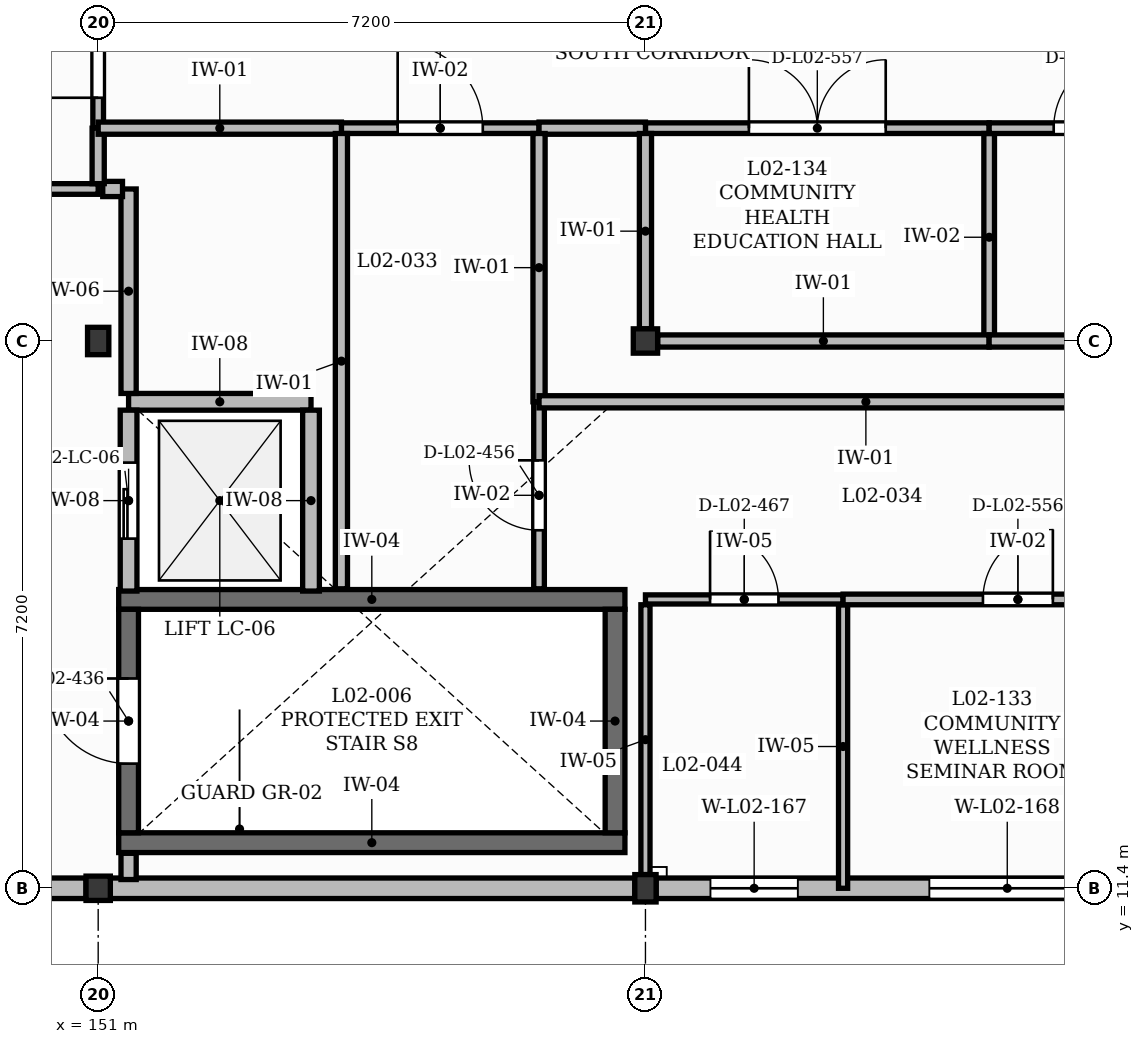
"""IFC4 building model, lengths in metres.
Left out: names, types, materials, properties, quantities, classifications, styles, units other than length and angle.
Written with IfcOpenShell. Run it as: python <this file> out.ifc"""

import sys

from ifc_helpers import new_model, si_unit, direction, frame, frame_2d, origin, origin_2d, place, context, subcontext, project, spatial, rectangle, extrude, element, fill, save


model = new_model("IFC4")
c1 = context("Model", 3, precision=1e-05, world=origin(), true_north=direction((0.0, 1.0)))
c2 = subcontext(c1, "Body", "Model", "MODEL_VIEW")
j1 = project(units=[si_unit("LENGTHUNIT", "METRE"), si_unit("PLANEANGLEUNIT", "RADIAN")], contexts=[c1])
p1 = place(None, origin())
s1 = spatial("IfcSite", under=j1, at=p1, CompositionType="ELEMENT")
p2 = place(p1, origin())
s2 = spatial("IfcBuilding", under=s1, at=p2, CompositionType="ELEMENT")
p3 = place(p2, frame((0.0, 0.0, 9.0)))
s3 = spatial("IfcBuildingStorey", under=s2, at=p3, CompositionType="ELEMENT", Elevation=9.0)
p4 = place(p3, frame((151.0, 11.4, 0.0), z_axis=(0.0, 0.0, 1.0), x_axis=(1.0, 0.0, 0.0)))
e1 = element("IfcColumn", 1, at=p4, inside=s3, PredefinedType="COLUMN", context=c2, shape_type="SweptSolid", body=[
    extrude(rectangle(XDim=0.32, YDim=0.32, at=origin_2d()), origin(), (0.0, 0.0, 1.0), 5.775),
])
p5 = place(p3, frame((151.0, 18.6, 0.0), z_axis=(0.0, 0.0, 1.0), x_axis=(1.0, 0.0, 0.0)))
e2 = element("IfcColumn", 2, at=p5, inside=s3, PredefinedType="COLUMN", context=c2, shape_type="SweptSolid", body=[
    extrude(rectangle(XDim=0.28, YDim=0.36, at=origin_2d()), origin(), (0.0, 0.0, 1.0), 5.775),
])
p6 = place(p3, frame((158.2, 11.4, 0.0), z_axis=(0.0, 0.0, 1.0), x_axis=(1.0, 0.0, 0.0)))
e3 = element("IfcColumn", 3, at=p6, inside=s3, PredefinedType="COLUMN", context=c2, shape_type="SweptSolid", body=[
    extrude(rectangle(XDim=0.28, YDim=0.36, at=origin_2d()), origin(), (0.0, 0.0, 1.0), 7.57),
])
p7 = place(p3, frame((158.2, 18.6, 0.0), z_axis=(0.0, 0.0, 1.0), x_axis=(1.0, 0.0, 0.0)))
e4 = element("IfcColumn", 4, at=p7, inside=s3, PredefinedType="COLUMN", context=c2, shape_type="SweptSolid", body=[
    extrude(rectangle(XDim=0.32, YDim=0.32, at=origin_2d()), origin(), (0.0, 0.0, 1.0), 7.57),
])
p8 = place(p3, frame((143.94, 11.4, 0.0), z_axis=(0.0, 0.0, 1.0), x_axis=(1.0, 0.0, 0.0)))
e5 = element("IfcWall", 5, at=p8, inside=s3, PredefinedType="SOLIDWALL", context=c2, shape_type="SweptSolid", body=[
    extrude(rectangle(XDim=6.9, YDim=0.27, at=frame_2d((3.45, 0.0))), origin(), (0.0, 0.0, 1.0), 3.54),
])
p9 = place(p8, frame((1.065, 0.0, 1.35)))
e6 = element("IfcOpeningElement", 6, at=p9, cuts=e5, PredefinedType="OPENING", context=c2, shape_type="SweptSolid", body=[
    extrude(rectangle(XDim=1.65, YDim=1.4, at=frame_2d((0.825, 0.7))), frame((0.0, 0.145, 0.0), z_axis=(0.0, -1.0, 0.0), x_axis=(1.0, 0.0, 0.0)), (0.0, 0.0, 1.0), 0.29),
])
p10 = place(p8, frame((4.34, 0.0, 1.0)))
e7 = element("IfcOpeningElement", 7, at=p10, cuts=e5, PredefinedType="OPENING", context=c2, shape_type="SweptSolid", body=[
    extrude(rectangle(XDim=1.76, YDim=1.95, at=frame_2d((0.88, 0.975))), frame((0.0, 0.145, 0.0), z_axis=(0.0, -1.0, 0.0), x_axis=(1.0, 0.0, 0.0)), (0.0, 0.0, 1.0), 0.29),
])
p11 = place(p3, frame((151.16, 11.4, 0.0), z_axis=(0.0, 0.0, 1.0), x_axis=(1.0, 0.0, 0.0)))
e8 = element("IfcWall", 8, at=p11, inside=s3, PredefinedType="SOLIDWALL", context=c2, shape_type="SweptSolid", body=[
    extrude(rectangle(XDim=6.9, YDim=0.27, at=frame_2d((3.45, 0.0))), origin(), (0.0, 0.0, 1.0), 3.54),
])
p12 = place(p3, frame((158.34, 11.4, 0.0), z_axis=(0.0, 0.0, 1.0), x_axis=(1.0, 0.0, 0.0)))
e9 = element("IfcWall", 9, at=p12, inside=s3, PredefinedType="SOLIDWALL", context=c2, shape_type="SweptSolid", body=[
    extrude(rectangle(XDim=6.9, YDim=0.27, at=frame_2d((3.45, 0.0))), origin(), (0.0, 0.0, 1.0), 3.54),
])
p13 = place(p12, frame((0.715, 0.0, 1.5)))
e10 = element("IfcOpeningElement", 10, at=p13, cuts=e9, PredefinedType="OPENING", context=c2, shape_type="SweptSolid", body=[
    extrude(rectangle(XDim=1.15, YDim=1.25, at=frame_2d((0.575, 0.625))), frame((0.0, 0.145, 0.0), z_axis=(0.0, -1.0, 0.0), x_axis=(1.0, 0.0, 0.0)), (0.0, 0.0, 1.0), 0.29),
])
p14 = place(p12, frame((3.595, 0.0, 1.0)))
e11 = element("IfcOpeningElement", 11, at=p14, cuts=e9, PredefinedType="OPENING", context=c2, shape_type="SweptSolid", body=[
    extrude(rectangle(XDim=2.05, YDim=1.95, at=frame_2d((1.025, 0.975))), frame((0.0, 0.145, 0.0), z_axis=(0.0, -1.0, 0.0), x_axis=(1.0, 0.0, 0.0)), (0.0, 0.0, 1.0), 0.29),
])
for number, where, z_axis, x_axis in (
    (12, (151.27, 12.0, 0.0), (0.0, 0.0, 1.0), (1.0, 0.0, 0.0)),
    (13, (151.27, 15.2, 0.0), (0.0, 0.0, 1.0), (1.0, 0.0, 0.0)),
):
    element("IfcWall", number, at=place(p3, frame(where, z_axis=z_axis, x_axis=x_axis)), inside=s3, PredefinedType="SHEAR", context=c2, shape_type="SweptSolid", body=[
        extrude(rectangle(XDim=6.66, YDim=0.26, at=frame_2d((3.33, 0.0))), origin(), (0.0, 0.0, 1.0), 3.95),
    ])
p15 = place(p3, frame((151.4, 12.13, 0.0), z_axis=(0.0, 0.0, 1.0), x_axis=(0.0, 1.0, 0.0)))
e14 = element("IfcWall", 14, at=p15, inside=s3, PredefinedType="SHEAR", context=c2, shape_type="SweptSolid", body=[
    extrude(rectangle(XDim=2.94, YDim=0.26, at=frame_2d((1.47, 0.0))), origin(), (0.0, 0.0, 1.0), 3.95),
])
p16 = place(p15, frame((0.91, 0.0, 0.0)))
e15 = element("IfcOpeningElement", 15, at=p16, cuts=e14, PredefinedType="OPENING", context=c2, shape_type="SweptSolid", body=[
    extrude(rectangle(XDim=1.12, YDim=2.1, at=frame_2d((0.56, 1.05))), frame((0.0, 0.14, 0.0), z_axis=(0.0, -1.0, 0.0), x_axis=(1.0, 0.0, 0.0)), (0.0, 0.0, 1.0), 0.28),
])
p17 = place(p3, frame((157.8, 12.13, 0.0), z_axis=(0.0, 0.0, 1.0), x_axis=(0.0, 1.0, 0.0)))
e16 = element("IfcWall", 16, at=p17, inside=s3, PredefinedType="SHEAR", context=c2, shape_type="SweptSolid", body=[
    extrude(rectangle(XDim=2.94, YDim=0.26, at=frame_2d((1.47, 0.0))), origin(), (0.0, 0.0, 1.0), 3.95),
])
p18 = place(p3, frame((151.4, 17.8, 0.0), z_axis=(0.0, 0.0, 1.0), x_axis=(1.0, 0.0, 0.0)))
e17 = element("IfcWall", 17, at=p18, inside=s3, PredefinedType="SOLIDWALL", context=c2, shape_type="SweptSolid", body=[
    extrude(rectangle(XDim=2.4, YDim=0.22, at=frame_2d((1.2, 0.0))), origin(), (0.0, 0.0, 1.0), 3.95),
])
p19 = place(p3, frame((151.4, 15.31, 0.0), z_axis=(0.0, 0.0, 1.0), x_axis=(0.0, 1.0, 0.0)))
e18 = element("IfcWall", 18, at=p19, inside=s3, PredefinedType="SOLIDWALL", context=c2, shape_type="SweptSolid", body=[
    extrude(rectangle(XDim=2.38, YDim=0.22, at=frame_2d((1.19, 0.0))), origin(), (0.0, 0.0, 1.0), 3.95),
])
p20 = place(p19, frame((0.69, 0.0, 0.0)))
e19 = element("IfcOpeningElement", 19, at=p20, cuts=e18, PredefinedType="OPENING", context=c2, shape_type="SweptSolid", body=[
    extrude(rectangle(XDim=1.0, YDim=2.15, at=frame_2d((0.5, 1.075))), frame((0.0, 0.12, 0.0), z_axis=(0.0, -1.0, 0.0), x_axis=(1.0, 0.0, 0.0)), (0.0, 0.0, 1.0), 0.24),
])
p21 = place(p3, frame((153.8, 15.31, 0.0), z_axis=(0.0, 0.0, 1.0), x_axis=(0.0, 1.0, 0.0)))
e20 = element("IfcWall", 20, at=p21, inside=s3, PredefinedType="SOLIDWALL", context=c2, shape_type="SweptSolid", body=[
    extrude(rectangle(XDim=2.38, YDim=0.22, at=frame_2d((1.19, 0.0))), origin(), (0.0, 0.0, 1.0), 3.95),
])
p22 = place(p3, frame((147.6, 20.6, 0.0), z_axis=(0.0, 0.0, 1.0), x_axis=(1.0, 0.0, 0.0)))
e21 = element("IfcWall", 21, at=p22, inside=s3, PredefinedType="PARTITIONING", context=c2, shape_type="SweptSolid", body=[
    extrude(rectangle(XDim=3.4, YDim=0.14, at=frame_2d((1.7, 0.0))), origin(), (0.0, 0.0, 1.0), 3.78),
])
p23 = place(p22, frame((1.24, 0.0, 0.0)))
e22 = element("IfcOpeningElement", 22, at=p23, cuts=e21, PredefinedType="OPENING", context=c2, shape_type="SweptSolid", body=[
    extrude(rectangle(XDim=0.92, YDim=2.1, at=frame_2d((0.46, 1.05))), frame((0.0, 0.08, 0.0), z_axis=(0.0, -1.0, 0.0), x_axis=(1.0, 0.0, 0.0)), (0.0, 0.0, 1.0), 0.16),
])
p24 = place(p3, frame((151.0, 21.4, 0.0), z_axis=(0.0, 0.0, 1.0), x_axis=(0.0, 1.0, 0.0)))
e23 = element("IfcWall", 23, at=p24, inside=s3, PredefinedType="PARTITIONING", context=c2, shape_type="SweptSolid", body=[
    extrude(rectangle(XDim=2.6, YDim=0.14, at=frame_2d((1.3, 0.0))), origin(), (0.0, 0.0, 1.0), 3.78),
])
p25 = place(p24, frame((0.4, 0.0, 0.0)))
e24 = element("IfcOpeningElement", 24, at=p25, cuts=e23, PredefinedType="OPENING", context=c2, shape_type="SweptSolid", body=[
    extrude(rectangle(XDim=1.8, YDim=2.3, at=frame_2d((0.9, 1.15))), frame((0.0, 0.08, 0.0), z_axis=(0.0, -1.0, 0.0), x_axis=(1.0, 0.0, 0.0)), (0.0, 0.0, 1.0), 0.16),
])
p26 = place(p3, frame((154.2, 21.4, 0.0), z_axis=(0.0, 0.0, 1.0), x_axis=(1.0, 0.0, 0.0)))
e25 = element("IfcWall", 25, at=p26, inside=s3, PredefinedType="PARTITIONING", context=c2, shape_type="SweptSolid", body=[
    extrude(rectangle(XDim=2.6, YDim=0.14, at=frame_2d((1.3, 0.0))), origin(), (0.0, 0.0, 1.0), 3.78),
])
p27 = place(p26, frame((0.74, 0.0, 0.0)))
e26 = element("IfcOpeningElement", 26, at=p27, cuts=e25, PredefinedType="OPENING", context=c2, shape_type="SweptSolid", body=[
    extrude(rectangle(XDim=1.12, YDim=2.15, at=frame_2d((0.56, 1.075))), frame((0.0, 0.08, 0.0), z_axis=(0.0, -1.0, 0.0), x_axis=(1.0, 0.0, 0.0)), (0.0, 0.0, 1.0), 0.16),
])
p28 = place(p3, frame((156.8, 15.34, 0.0), z_axis=(0.0, 0.0, 1.0), x_axis=(0.0, 1.0, 0.0)))
e27 = element("IfcWall", 27, at=p28, inside=s3, PredefinedType="PARTITIONING", context=c2, shape_type="SweptSolid", body=[
    extrude(rectangle(XDim=2.46, YDim=0.14, at=frame_2d((1.23, 0.0))), origin(), (0.0, 0.0, 1.0), 3.78),
])
p29 = place(p28, frame((0.77, 0.0, 0.0)))
e28 = element("IfcOpeningElement", 28, at=p29, cuts=e27, PredefinedType="OPENING", context=c2, shape_type="SweptSolid", body=[
    extrude(rectangle(XDim=0.92, YDim=2.1, at=frame_2d((0.46, 1.05))), frame((0.0, 0.08, 0.0), z_axis=(0.0, -1.0, 0.0), x_axis=(1.0, 0.0, 0.0)), (0.0, 0.0, 1.0), 0.16),
])
p30 = place(p3, frame((158.2, 15.2, 0.0), z_axis=(0.0, 0.0, 1.0), x_axis=(1.0, 0.0, 0.0)))
e29 = element("IfcWall", 29, at=p30, inside=s3, PredefinedType="PLUMBINGWALL", context=c2, shape_type="SweptSolid", body=[
    extrude(rectangle(XDim=2.6, YDim=0.12, at=frame_2d((1.3, 0.0))), origin(), (0.0, 0.0, 1.0), 3.78),
])
p31 = place(p30, frame((0.85, 0.0, 0.0)))
e30 = element("IfcOpeningElement", 30, at=p31, cuts=e29, PredefinedType="OPENING", context=c2, shape_type="SweptSolid", body=[
    extrude(rectangle(XDim=0.9, YDim=2.1, at=frame_2d((0.45, 1.05))), frame((0.0, 0.07, 0.0), z_axis=(0.0, -1.0, 0.0), x_axis=(1.0, 0.0, 0.0)), (0.0, 0.0, 1.0), 0.14),
])
p32 = place(p3, frame((158.2, 21.4, 0.0), z_axis=(0.0, 0.0, 1.0), x_axis=(1.0, 0.0, 0.0)))
e31 = element("IfcWall", 31, at=p32, inside=s3, PredefinedType="PARTITIONING", context=c2, shape_type="SweptSolid", body=[
    extrude(rectangle(XDim=4.522, YDim=0.14, at=frame_2d((2.261, 0.0))), origin(), (0.0, 0.0, 1.0), 3.78),
])
p33 = place(p32, frame((1.361, 0.0, 0.0)))
e32 = element("IfcOpeningElement", 32, at=p33, cuts=e31, PredefinedType="OPENING", context=c2, shape_type="SweptSolid", body=[
    extrude(rectangle(XDim=1.8, YDim=2.3, at=frame_2d((0.9, 1.15))), frame((0.0, 0.08, 0.0), z_axis=(0.0, -1.0, 0.0), x_axis=(1.0, 0.0, 0.0)), (0.0, 0.0, 1.0), 0.16),
])
p34 = place(p3, frame((160.8, 11.4, 0.0), z_axis=(0.0, 0.0, 1.0), x_axis=(0.0, 1.0, 0.0)))
e33 = element("IfcWall", 33, at=p34, inside=s3, PredefinedType="PLUMBINGWALL", context=c2, shape_type="SweptSolid", body=[
    extrude(rectangle(XDim=3.73, YDim=0.12, at=frame_2d((1.865, 0.0))), origin(), (0.0, 0.0, 1.0), 3.78),
])
p35 = place(p3, frame((160.8, 15.2, 0.0), z_axis=(0.0, 0.0, 1.0), x_axis=(1.0, 0.0, 0.0)))
e34 = element("IfcWall", 34, at=p35, inside=s3, PredefinedType="PARTITIONING", context=c2, shape_type="SweptSolid", body=[
    extrude(rectangle(XDim=4.6, YDim=0.14, at=frame_2d((2.3, 0.0))), origin(), (0.0, 0.0, 1.0), 3.78),
])
p36 = place(p35, frame((1.84, 0.0, 0.0)))
e35 = element("IfcOpeningElement", 35, at=p36, cuts=e34, PredefinedType="OPENING", context=c2, shape_type="SweptSolid", body=[
    extrude(rectangle(XDim=0.92, YDim=2.1, at=frame_2d((0.46, 1.05))), frame((0.0, 0.08, 0.0), z_axis=(0.0, -1.0, 0.0), x_axis=(1.0, 0.0, 0.0)), (0.0, 0.0, 1.0), 0.16),
])
p37 = place(p3, frame((162.722, 18.6, 0.0), z_axis=(0.0, 0.0, 1.0), x_axis=(0.0, 1.0, 0.0)))
e36 = element("IfcWall", 36, at=p37, inside=s3, PredefinedType="PARTITIONING", context=c2, shape_type="SweptSolid", body=[
    extrude(rectangle(XDim=2.73, YDim=0.14, at=frame_2d((1.365, 0.0))), origin(), (0.0, 0.0, 1.0), 3.78),
])
p38 = place(p3, frame((162.722, 21.4, 0.0), z_axis=(0.0, 0.0, 1.0), x_axis=(1.0, 0.0, 0.0)))
e37 = element("IfcWall", 37, at=p38, inside=s3, PredefinedType="PARTITIONING", context=c2, shape_type="SweptSolid", body=[
    extrude(rectangle(XDim=2.678, YDim=0.14, at=frame_2d((1.339, 0.0))), origin(), (0.0, 0.0, 1.0), 3.78),
])
p39 = place(p38, frame((0.849, 0.0, 0.0)))
e38 = element("IfcOpeningElement", 38, at=p39, cuts=e37, PredefinedType="OPENING", context=c2, shape_type="SweptSolid", body=[
    extrude(rectangle(XDim=0.98, YDim=2.15, at=frame_2d((0.49, 1.075))), frame((0.0, 0.08, 0.0), z_axis=(0.0, -1.0, 0.0), x_axis=(1.0, 0.0, 0.0)), (0.0, 0.0, 1.0), 0.16),
])
p40 = place(p3, frame((151.4, 11.515, 0.0), z_axis=(0.0, 0.0, 1.0), x_axis=(0.0, 1.0, 0.0)))
e39 = element("IfcWall", 39, at=p40, inside=s3, PredefinedType="PARTITIONING", context=c2, shape_type="SweptSolid", body=[
    extrude(rectangle(XDim=0.345, YDim=0.2, at=frame_2d((0.173, 0.0))), origin(), (0.0, 0.0, 1.0), 3.78),
])
p41 = place(p3, frame((151.4, 17.91, 0.0), z_axis=(0.0, 0.0, 1.0), x_axis=(0.0, 1.0, 0.0)))
e40 = element("IfcWall", 40, at=p41, inside=s3, PredefinedType="PARTITIONING", context=c2, shape_type="SweptSolid", body=[
    extrude(rectangle(XDim=2.69, YDim=0.2, at=frame_2d((1.345, 0.0))), origin(), (0.0, 0.0, 1.0), 3.78),
])
p42 = place(p3, frame((151.32, 20.6, 0.0), z_axis=(0.0, 0.0, 1.0), x_axis=(-1.0, 0.0, 0.0)))
e41 = element("IfcWall", 41, at=p42, inside=s3, PredefinedType="PARTITIONING", context=c2, shape_type="SweptSolid", body=[
    extrude(rectangle(XDim=0.26, YDim=0.2, at=frame_2d((0.13, 0.0))), origin(), (0.0, 0.0, 1.0), 3.78),
])
p43 = place(p3, frame((151.0, 20.67, 0.0), z_axis=(0.0, 0.0, 1.0), x_axis=(0.0, 1.0, 0.0)))
e42 = element("IfcWall", 42, at=p43, inside=s3, PredefinedType="PARTITIONING", context=c2, shape_type="SweptSolid", body=[
    extrude(rectangle(XDim=0.73, YDim=0.16, at=frame_2d((0.365, 0.0))), origin(), (0.0, 0.0, 1.0), 3.78),
])
p44 = place(p3, frame((151.0, 21.4, 0.0), z_axis=(0.0, 0.0, 1.0), x_axis=(1.0, 0.0, 0.0)))
e43 = element("IfcWall", 43, at=p44, inside=s3, PredefinedType="PARTITIONING", context=c2, shape_type="SweptSolid", body=[
    extrude(rectangle(XDim=3.2, YDim=0.16, at=frame_2d((1.6, 0.0))), origin(), (0.0, 0.0, 1.0), 3.78),
])
p45 = place(p3, frame((156.8, 21.4, 0.0), z_axis=(0.0, 0.0, 1.0), x_axis=(1.0, 0.0, 0.0)))
e44 = element("IfcWall", 44, at=p45, inside=s3, PredefinedType="PARTITIONING", context=c2, shape_type="SweptSolid", body=[
    extrude(rectangle(XDim=1.4, YDim=0.16, at=frame_2d((0.7, 0.0))), origin(), (0.0, 0.0, 1.0), 3.78),
])
p46 = place(p3, frame((156.8, 17.8, 0.0), z_axis=(0.0, 0.0, 1.0), x_axis=(0.0, 1.0, 0.0)))
e45 = element("IfcWall", 45, at=p46, inside=s3, PredefinedType="PARTITIONING", context=c2, shape_type="SweptSolid", body=[
    extrude(rectangle(XDim=3.53, YDim=0.16, at=frame_2d((1.765, 0.0))), origin(), (0.0, 0.0, 1.0), 3.78),
])
p47 = place(p3, frame((154.2, 15.34, 0.0), z_axis=(0.0, 0.0, 1.0), x_axis=(0.0, 1.0, 0.0)))
e46 = element("IfcWall", 46, at=p47, inside=s3, PredefinedType="PARTITIONING", context=c2, shape_type="SweptSolid", body=[
    extrude(rectangle(XDim=5.99, YDim=0.16, at=frame_2d((2.995, 0.0))), origin(), (0.0, 0.0, 1.0), 3.78),
])
p48 = place(p3, frame((165.4, 17.8, 0.0), z_axis=(0.0, 0.0, 1.0), x_axis=(-1.0, 0.0, 0.0)))
e47 = element("IfcWall", 47, at=p48, inside=s3, PredefinedType="PARTITIONING", context=c2, shape_type="SweptSolid", body=[
    extrude(rectangle(XDim=8.6, YDim=0.16, at=frame_2d((4.3, 0.0))), origin(), (0.0, 0.0, 1.0), 3.78),
])
p49 = place(p3, frame((158.2, 11.58, 0.0), z_axis=(0.0, 0.0, 1.0), x_axis=(0.0, 1.0, 0.0)))
e48 = element("IfcWall", 48, at=p49, inside=s3, PredefinedType="PLUMBINGWALL", context=c2, shape_type="SweptSolid", body=[
    extrude(rectangle(XDim=3.55, YDim=0.12, at=frame_2d((1.775, 0.0))), origin(), (0.0, 0.0, 1.0), 3.78),
])
p50 = place(p3, frame((158.36, 18.6, 0.0), z_axis=(0.0, 0.0, 1.0), x_axis=(1.0, 0.0, 0.0)))
e49 = element("IfcWall", 49, at=p50, inside=s3, PredefinedType="PARTITIONING", context=c2, shape_type="SweptSolid", body=[
    extrude(rectangle(XDim=4.362, YDim=0.16, at=frame_2d((2.181, 0.0))), origin(), (0.0, 0.0, 1.0), 3.78),
])
p51 = place(p3, frame((158.2, 18.76, 0.0), z_axis=(0.0, 0.0, 1.0), x_axis=(0.0, 1.0, 0.0)))
e50 = element("IfcWall", 50, at=p51, inside=s3, PredefinedType="PARTITIONING", context=c2, shape_type="SweptSolid", body=[
    extrude(rectangle(XDim=2.57, YDim=0.16, at=frame_2d((1.285, 0.0))), origin(), (0.0, 0.0, 1.0), 3.78),
])
p52 = place(p3, frame((162.722, 18.6, 0.0), z_axis=(0.0, 0.0, 1.0), x_axis=(1.0, 0.0, 0.0)))
e51 = element("IfcWall", 51, at=p52, inside=s3, PredefinedType="PARTITIONING", context=c2, shape_type="SweptSolid", body=[
    extrude(rectangle(XDim=2.538, YDim=0.16, at=frame_2d((1.269, 0.0))), origin(), (0.0, 0.0, 1.0), 3.78),
])
p53 = place(p13, origin())
e52 = element("IfcWindow", 52, at=p53, inside=s3, PartitioningType="SINGLE_PANEL", PredefinedType="WINDOW", context=c2, shape_type="SweptSolid", body=[
    extrude(rectangle(XDim=1.15, YDim=1.25, at=frame_2d((0.575, 0.625))), frame((0.0, 0.03, 0.0), z_axis=(0.0, -1.0, 0.0), x_axis=(1.0, 0.0, 0.0)), (0.0, 0.0, 1.0), 0.06),
])
fill(e10, e52)
p54 = place(p14, origin())
e53 = element("IfcWindow", 53, at=p54, inside=s3, PartitioningType="DOUBLE_PANEL_VERTICAL", PredefinedType="WINDOW", context=c2, shape_type="SweptSolid", body=[
    extrude(rectangle(XDim=2.05, YDim=1.95, at=frame_2d((1.025, 0.975))), frame((0.0, 0.03, 0.0), z_axis=(0.0, -1.0, 0.0), x_axis=(1.0, 0.0, 0.0)), (0.0, 0.0, 1.0), 0.06),
])
fill(e11, e53)
p55 = place(p20, origin())
e54 = element("IfcDoor", 54, at=p55, inside=s3, OperationType="SLIDING_TO_LEFT", PredefinedType="DOOR", context=c2, shape_type="SweptSolid", body=[
    extrude(rectangle(XDim=1.0, YDim=2.15, at=frame_2d((0.5, 1.075))), frame((0.0, 0.025, 0.0), z_axis=(0.0, -1.0, 0.0), x_axis=(1.0, 0.0, 0.0)), (0.0, 0.0, 1.0), 0.05),
])
fill(e19, e54)
p56 = place(p16, origin())
e55 = element("IfcDoor", 55, at=p56, inside=s3, OperationType="SINGLE_SWING_RIGHT", PredefinedType="DOOR", context=c2, shape_type="SweptSolid", body=[
    extrude(rectangle(XDim=1.12, YDim=2.1, at=frame_2d((0.56, 1.05))), frame((0.0, 0.025, 0.0), z_axis=(0.0, -1.0, 0.0), x_axis=(1.0, 0.0, 0.0)), (0.0, 0.0, 1.0), 0.05),
])
fill(e15, e55)
p57 = place(p25, origin())
e56 = element("IfcDoor", 56, at=p57, inside=s3, OperationType="DOUBLE_DOOR_SINGLE_SWING", PredefinedType="DOOR", context=c2, shape_type="SweptSolid", body=[
    extrude(rectangle(XDim=1.8, YDim=2.3, at=frame_2d((0.9, 1.15))), frame((0.0, 0.025, 0.0), z_axis=(0.0, -1.0, 0.0), x_axis=(1.0, 0.0, 0.0)), (0.0, 0.0, 1.0), 0.05),
])
fill(e24, e56)
p58 = place(p27, origin())
e57 = element("IfcDoor", 57, at=p58, inside=s3, OperationType="SINGLE_SWING_LEFT", PredefinedType="DOOR", context=c2, shape_type="SweptSolid", body=[
    extrude(rectangle(XDim=1.12, YDim=2.15, at=frame_2d((0.56, 1.075))), frame((0.0, 0.025, 0.0), z_axis=(0.0, -1.0, 0.0), x_axis=(1.0, 0.0, 0.0)), (0.0, 0.0, 1.0), 0.05),
])
fill(e26, e57)
p59 = place(p29, origin())
e58 = element("IfcDoor", 58, at=p59, inside=s3, OperationType="SINGLE_SWING_RIGHT", PredefinedType="DOOR", context=c2, shape_type="SweptSolid", body=[
    extrude(rectangle(XDim=0.92, YDim=2.1, at=frame_2d((0.46, 1.05))), frame((0.0, 0.025, 0.0), z_axis=(0.0, -1.0, 0.0), x_axis=(1.0, 0.0, 0.0)), (0.0, 0.0, 1.0), 0.05),
])
fill(e28, e58)
p60 = place(p31, origin())
e59 = element("IfcDoor", 59, at=p60, inside=s3, OperationType="SINGLE_SWING_LEFT", PredefinedType="DOOR", context=c2, shape_type="SweptSolid", body=[
    extrude(rectangle(XDim=0.9, YDim=2.1, at=frame_2d((0.45, 1.05))), frame((0.0, 0.025, 0.0), z_axis=(0.0, -1.0, 0.0), x_axis=(1.0, 0.0, 0.0)), (0.0, 0.0, 1.0), 0.05),
])
fill(e30, e59)
p61 = place(p36, origin())
e60 = element("IfcDoor", 60, at=p61, inside=s3, OperationType="SINGLE_SWING_RIGHT", PredefinedType="DOOR", context=c2, shape_type="SweptSolid", body=[
    extrude(rectangle(XDim=0.92, YDim=2.1, at=frame_2d((0.46, 1.05))), frame((0.0, 0.025, 0.0), z_axis=(0.0, -1.0, 0.0), x_axis=(1.0, 0.0, 0.0)), (0.0, 0.0, 1.0), 0.05),
])
fill(e35, e60)
p62 = place(p33, origin())
e61 = element("IfcDoor", 61, at=p62, inside=s3, OperationType="DOUBLE_DOOR_SINGLE_SWING", PredefinedType="DOOR", context=c2, shape_type="SweptSolid", body=[
    extrude(rectangle(XDim=1.8, YDim=2.3, at=frame_2d((0.9, 1.15))), frame((0.0, 0.025, 0.0), z_axis=(0.0, -1.0, 0.0), x_axis=(1.0, 0.0, 0.0)), (0.0, 0.0, 1.0), 0.05),
])
fill(e32, e61)
p63 = place(p39, origin())
e62 = element("IfcDoor", 62, at=p63, inside=s3, OperationType="SINGLE_SWING_RIGHT", PredefinedType="DOOR", context=c2, shape_type="SweptSolid", body=[
    extrude(rectangle(XDim=0.98, YDim=2.15, at=frame_2d((0.49, 1.075))), frame((0.0, 0.025, 0.0), z_axis=(0.0, -1.0, 0.0), x_axis=(1.0, 0.0, 0.0)), (0.0, 0.0, 1.0), 0.05),
])
fill(e38, e62)
save(model, sys.argv[1])
